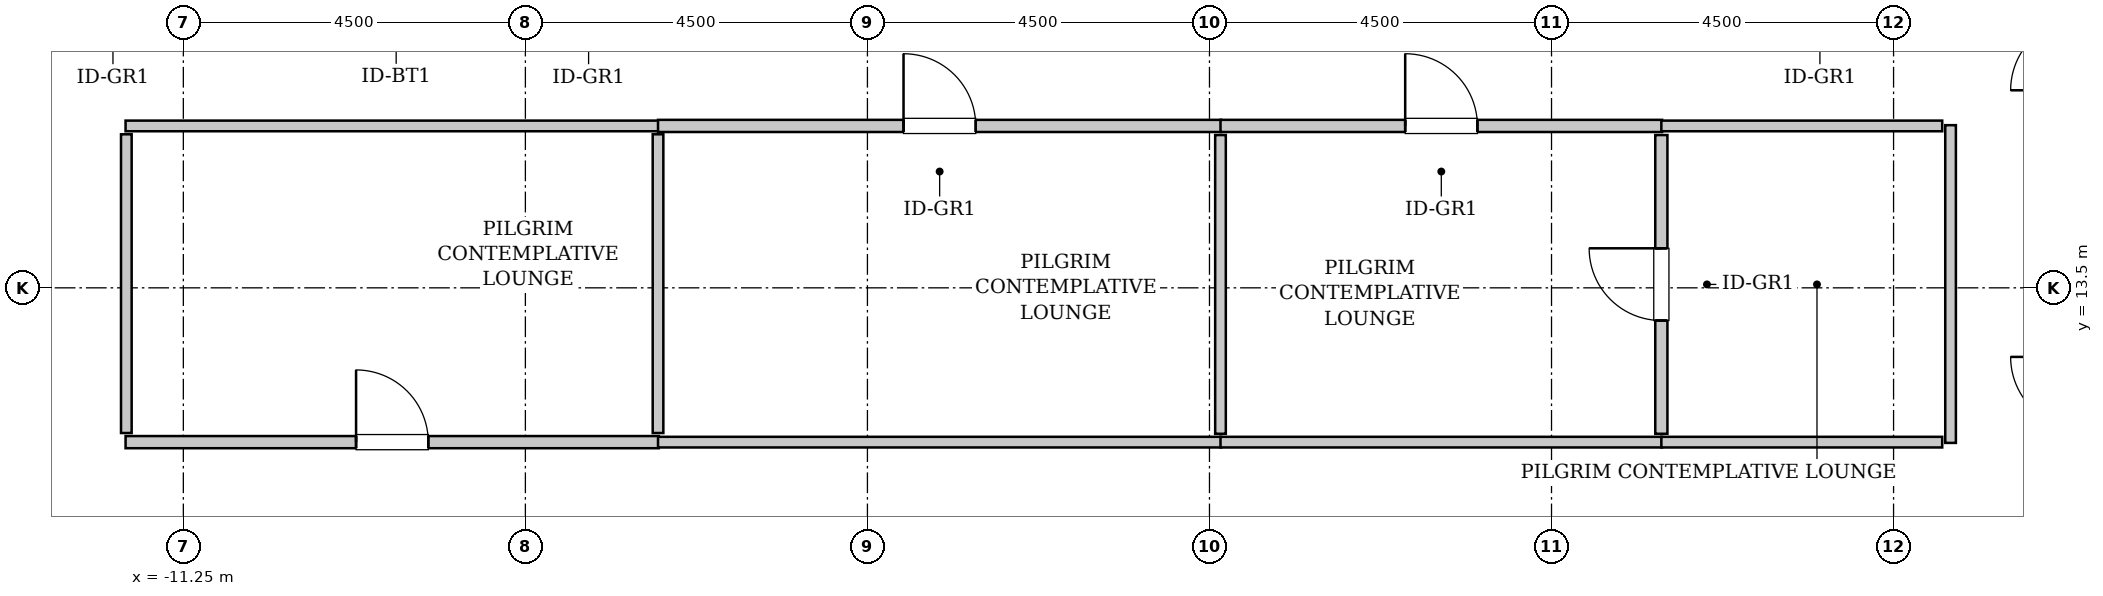
"""IFC4 building model, lengths in metres.
Left out: names, types, materials, properties, quantities, classifications, styles, units other than length and angle.
Written with IfcOpenShell. Run it as: python <this file> out.ifc"""

import sys

from ifc_helpers import new_model, si_unit, direction, frame, frame_2d, origin, place, context, subcontext, project, spatial, rectangle, extrude, source, transform, mapped, element, fill, save


model = new_model("IFC4")
c1 = context("Model", 3, precision=1e-05, world=origin(), true_north=direction((0.0, 1.0)))
c2 = subcontext(c1, "Body", "Model", "MODEL_VIEW")
j1 = project(units=[si_unit("LENGTHUNIT", "METRE"), si_unit("PLANEANGLEUNIT", "RADIAN")], contexts=[c1])
p1 = place(None, origin())
s1 = spatial("IfcSite", under=j1, at=p1, CompositionType="ELEMENT")
p2 = place(p1, origin())
s2 = spatial("IfcBuilding", under=s1, at=p2, CompositionType="ELEMENT")
p3 = place(p2, frame((0.0, 0.0, 156.4)))
s3 = spatial("IfcBuildingStorey", under=s2, at=p3, CompositionType="ELEMENT", Elevation=156.4)
m1 = source(origin(), c2, "Body", "SweptSolid", [
    extrude(rectangle(XDim=7.015, YDim=0.16, at=frame_2d((3.507, 0.0))), origin(), (0.0, 0.0, 1.0), 3.535),
])
p4 = place(p3, frame((-12.01, 11.47, 0.0), z_axis=(0.0, 0.0, 1.0), x_axis=(1.0, 0.0, 0.0)))
e1 = element("IfcWall", 1, at=p4, inside=s3, PredefinedType="PARTITIONING", context=c2, shape_type="MappedRepresentation", body=[
    mapped(m1, transform((0.0, 0.0, 0.0), x_axis=(1.0, 0.0, 0.0), y_axis=(0.0, 1.0, 0.0), z_axis=(0.0, 0.0, 1.0), scale=1.0)),
])
p5 = place(p4, frame((3.032, 0.0, 0.0)))
e2 = element("IfcOpeningElement", 2, at=p5, cuts=e1, PredefinedType="OPENING", context=c2, shape_type="SweptSolid", body=[
    extrude(rectangle(XDim=0.95, YDim=2.1, at=frame_2d((0.475, 1.05))), frame((0.0, 0.09, 0.0), z_axis=(0.0, -1.0, 0.0), x_axis=(1.0, 0.0, 0.0)), (0.0, 0.0, 1.0), 0.18),
])
m2 = source(origin(), c2, "Body", "SweptSolid", [
    extrude(rectangle(XDim=7.015, YDim=0.14, at=frame_2d((3.507, 0.0))), origin(), (0.0, 0.0, 1.0), 3.535),
])
p6 = place(p3, frame((-12.01, 15.63, 0.0), z_axis=(0.0, 0.0, 1.0), x_axis=(1.0, 0.0, 0.0)))
e3 = element("IfcWall", 3, at=p6, inside=s3, PredefinedType="PARTITIONING", context=c2, shape_type="MappedRepresentation", body=[
    mapped(m2, transform((0.0, 0.0, 0.0), x_axis=(1.0, 0.0, 0.0), y_axis=(0.0, 1.0, 0.0), z_axis=(0.0, 0.0, 1.0), scale=1.0)),
])
m3 = source(origin(), c2, "Body", "SweptSolid", [
    extrude(rectangle(XDim=3.93, YDim=0.14, at=frame_2d((1.965, 0.0))), origin(), (0.0, 0.0, 1.0), 3.535),
])
for number, where, z_axis, x_axis in (
    (4, (-12.0, 11.59, 0.0), (0.0, 0.0, 1.0), (0.0, 1.0, 0.0)),
    (5, (-5.005, 11.59, 0.0), (0.0, 0.0, 1.0), (0.0, 1.0, 0.0)),
):
    element("IfcWall", number, at=place(p3, frame(where, z_axis=z_axis, x_axis=x_axis)), inside=s3, PredefinedType="PARTITIONING", context=c2, shape_type="MappedRepresentation", body=[
        mapped(m3, transform((0.0, 0.0, 0.0), x_axis=(1.0, 0.0, 0.0), y_axis=(0.0, 1.0, 0.0), z_axis=(0.0, 0.0, 1.0), scale=1.0)),
    ])
m4 = source(origin(), c2, "Body", "SweptSolid", [
    extrude(rectangle(XDim=7.41, YDim=0.16, at=frame_2d((3.705, 0.0))), origin(), (0.0, 0.0, 1.0), 3.535),
])
p7 = place(p3, frame((-5.005, 15.63, 0.0), z_axis=(0.0, 0.0, 1.0), x_axis=(1.0, 0.0, 0.0)))
e6 = element("IfcWall", 6, at=p7, inside=s3, PredefinedType="PARTITIONING", context=c2, shape_type="MappedRepresentation", body=[
    mapped(m4, transform((0.0, 0.0, 0.0), x_axis=(1.0, 0.0, 0.0), y_axis=(0.0, 1.0, 0.0), z_axis=(0.0, 0.0, 1.0), scale=1.0)),
])
p8 = place(p7, frame((3.23, 0.0, 0.0)))
e7 = element("IfcOpeningElement", 7, at=p8, cuts=e6, PredefinedType="OPENING", context=c2, shape_type="SweptSolid", body=[
    extrude(rectangle(XDim=0.95, YDim=2.1, at=frame_2d((0.475, 1.05))), frame((0.0, 0.09, 0.0), z_axis=(0.0, -1.0, 0.0), x_axis=(1.0, 0.0, 0.0)), (0.0, 0.0, 1.0), 0.18),
])
m5 = source(origin(), c2, "Body", "SweptSolid", [
    extrude(rectangle(XDim=7.41, YDim=0.14, at=frame_2d((3.705, 0.0))), origin(), (0.0, 0.0, 1.0), 3.535),
])
p9 = place(p3, frame((-5.005, 11.47, 0.0), z_axis=(0.0, 0.0, 1.0), x_axis=(1.0, 0.0, 0.0)))
e8 = element("IfcWall", 8, at=p9, inside=s3, PredefinedType="PARTITIONING", context=c2, shape_type="MappedRepresentation", body=[
    mapped(m5, transform((0.0, 0.0, 0.0), x_axis=(1.0, 0.0, 0.0), y_axis=(0.0, 1.0, 0.0), z_axis=(0.0, 0.0, 1.0), scale=1.0)),
])
p10 = place(p3, frame((2.395, 11.58, 0.0), z_axis=(0.0, 0.0, 1.0), x_axis=(0.0, 1.0, 0.0)))
e9 = element("IfcWall", 9, at=p10, inside=s3, PredefinedType="PARTITIONING", context=c2, shape_type="MappedRepresentation", body=[
    mapped(m3, transform((0.0, 0.0, 0.0), x_axis=(1.0, 0.0, 0.0), y_axis=(0.0, 1.0, 0.0), z_axis=(0.0, 0.0, 1.0), scale=1.0)),
])
m6 = source(origin(), c2, "Body", "SweptSolid", [
    extrude(rectangle(XDim=5.81, YDim=0.16, at=frame_2d((2.905, 0.0))), origin(), (0.0, 0.0, 1.0), 3.535),
])
p11 = place(p3, frame((2.395, 15.63, 0.0), z_axis=(0.0, 0.0, 1.0), x_axis=(1.0, 0.0, 0.0)))
e10 = element("IfcWall", 10, at=p11, inside=s3, PredefinedType="PARTITIONING", context=c2, shape_type="MappedRepresentation", body=[
    mapped(m6, transform((0.0, 0.0, 0.0), x_axis=(1.0, 0.0, 0.0), y_axis=(0.0, 1.0, 0.0), z_axis=(0.0, 0.0, 1.0), scale=1.0)),
])
p12 = place(p11, frame((2.43, 0.0, 0.0)))
e11 = element("IfcOpeningElement", 11, at=p12, cuts=e10, PredefinedType="OPENING", context=c2, shape_type="SweptSolid", body=[
    extrude(rectangle(XDim=0.95, YDim=2.1, at=frame_2d((0.475, 1.05))), frame((0.0, 0.09, 0.0), z_axis=(0.0, -1.0, 0.0), x_axis=(1.0, 0.0, 0.0)), (0.0, 0.0, 1.0), 0.18),
])
m7 = source(origin(), c2, "Body", "SweptSolid", [
    extrude(rectangle(XDim=5.81, YDim=0.14, at=frame_2d((2.905, 0.0))), origin(), (0.0, 0.0, 1.0), 3.535),
])
p13 = place(p3, frame((2.395, 11.47, 0.0), z_axis=(0.0, 0.0, 1.0), x_axis=(1.0, 0.0, 0.0)))
e12 = element("IfcWall", 12, at=p13, inside=s3, PredefinedType="PARTITIONING", context=c2, shape_type="MappedRepresentation", body=[
    mapped(m7, transform((0.0, 0.0, 0.0), x_axis=(1.0, 0.0, 0.0), y_axis=(0.0, 1.0, 0.0), z_axis=(0.0, 0.0, 1.0), scale=1.0)),
])
m8 = source(origin(), c2, "Body", "SweptSolid", [
    extrude(rectangle(XDim=3.93, YDim=0.16, at=frame_2d((1.965, 0.0))), origin(), (0.0, 0.0, 1.0), 3.535),
])
p14 = place(p3, frame((8.195, 11.58, 0.0), z_axis=(0.0, 0.0, 1.0), x_axis=(0.0, 1.0, 0.0)))
e13 = element("IfcWall", 13, at=p14, inside=s3, PredefinedType="PARTITIONING", context=c2, shape_type="MappedRepresentation", body=[
    mapped(m8, transform((0.0, 0.0, 0.0), x_axis=(1.0, 0.0, 0.0), y_axis=(0.0, 1.0, 0.0), z_axis=(0.0, 0.0, 1.0), scale=1.0)),
])
p15 = place(p14, frame((1.49, 0.0, 0.0)))
e14 = element("IfcOpeningElement", 14, at=p15, cuts=e13, PredefinedType="OPENING", context=c2, shape_type="SweptSolid", body=[
    extrude(rectangle(XDim=0.95, YDim=2.1, at=frame_2d((0.475, 1.05))), frame((0.0, 0.09, 0.0), z_axis=(0.0, -1.0, 0.0), x_axis=(1.0, 0.0, 0.0)), (0.0, 0.0, 1.0), 0.18),
])
m9 = source(origin(), c2, "Body", "SweptSolid", [
    extrude(rectangle(XDim=4.18, YDim=0.14, at=frame_2d((2.09, 0.0))), origin(), (0.0, 0.0, 1.0), 3.535),
])
p16 = place(p3, frame((12.0, 11.46, 0.0), z_axis=(0.0, 0.0, 1.0), x_axis=(0.0, 1.0, 0.0)))
e15 = element("IfcWall", 15, at=p16, inside=s3, PredefinedType="PARTITIONING", context=c2, shape_type="MappedRepresentation", body=[
    mapped(m9, transform((0.0, 0.0, 0.0), x_axis=(1.0, 0.0, 0.0), y_axis=(0.0, 1.0, 0.0), z_axis=(0.0, 0.0, 1.0), scale=1.0)),
])
m10 = source(origin(), c2, "Body", "SweptSolid", [
    extrude(rectangle(XDim=3.695, YDim=0.14, at=frame_2d((1.847, 0.0))), origin(), (0.0, 0.0, 1.0), 3.535),
])
for number, where, z_axis, x_axis in (
    (16, (8.195, 15.63, 0.0), (0.0, 0.0, 1.0), (1.0, 0.0, 0.0)),
    (17, (8.195, 11.47, 0.0), (0.0, 0.0, 1.0), (1.0, 0.0, 0.0)),
):
    element("IfcWall", number, at=place(p3, frame(where, z_axis=z_axis, x_axis=x_axis)), inside=s3, PredefinedType="PARTITIONING", context=c2, shape_type="MappedRepresentation", body=[
        mapped(m10, transform((0.0, 0.0, 0.0), x_axis=(1.0, 0.0, 0.0), y_axis=(0.0, 1.0, 0.0), z_axis=(0.0, 0.0, 1.0), scale=1.0)),
    ])
m11 = source(origin(), c2, "Body", "SweptSolid", [
    extrude(rectangle(XDim=0.95, YDim=2.1, at=frame_2d((0.475, 1.05))), frame((0.0, 0.025, 0.0), z_axis=(0.0, -1.0, 0.0), x_axis=(1.0, 0.0, 0.0)), (0.0, 0.0, 1.0), 0.05),
])
p17 = place(p5, origin())
e18 = element("IfcDoor", 18, at=p17, inside=s3, OperationType="SINGLE_SWING_LEFT", PredefinedType="DOOR", context=c2, shape_type="MappedRepresentation", body=[
    mapped(m11, transform((0.0, 0.0, 0.0), x_axis=(1.0, 0.0, 0.0), y_axis=(0.0, 1.0, 0.0), z_axis=(0.0, 0.0, 1.0), scale=1.0)),
])
fill(e2, e18)
p18 = place(p8, origin())
e19 = element("IfcDoor", 19, at=p18, inside=s3, OperationType="SINGLE_SWING_LEFT", PredefinedType="DOOR", context=c2, shape_type="MappedRepresentation", body=[
    mapped(m11, transform((0.0, 0.0, 0.0), x_axis=(1.0, 0.0, 0.0), y_axis=(0.0, 1.0, 0.0), z_axis=(0.0, 0.0, 1.0), scale=1.0)),
])
fill(e7, e19)
p19 = place(p12, origin())
e20 = element("IfcDoor", 20, at=p19, inside=s3, OperationType="SINGLE_SWING_LEFT", PredefinedType="DOOR", context=c2, shape_type="MappedRepresentation", body=[
    mapped(m11, transform((0.0, 0.0, 0.0), x_axis=(1.0, 0.0, 0.0), y_axis=(0.0, 1.0, 0.0), z_axis=(0.0, 0.0, 1.0), scale=1.0)),
])
fill(e11, e20)
p20 = place(p15, origin())
e21 = element("IfcDoor", 21, at=p20, inside=s3, OperationType="SINGLE_SWING_RIGHT", PredefinedType="DOOR", context=c2, shape_type="MappedRepresentation", body=[
    mapped(m11, transform((0.0, 0.0, 0.0), x_axis=(1.0, 0.0, 0.0), y_axis=(0.0, 1.0, 0.0), z_axis=(0.0, 0.0, 1.0), scale=1.0)),
])
fill(e14, e21)
save(model, sys.argv[1])
